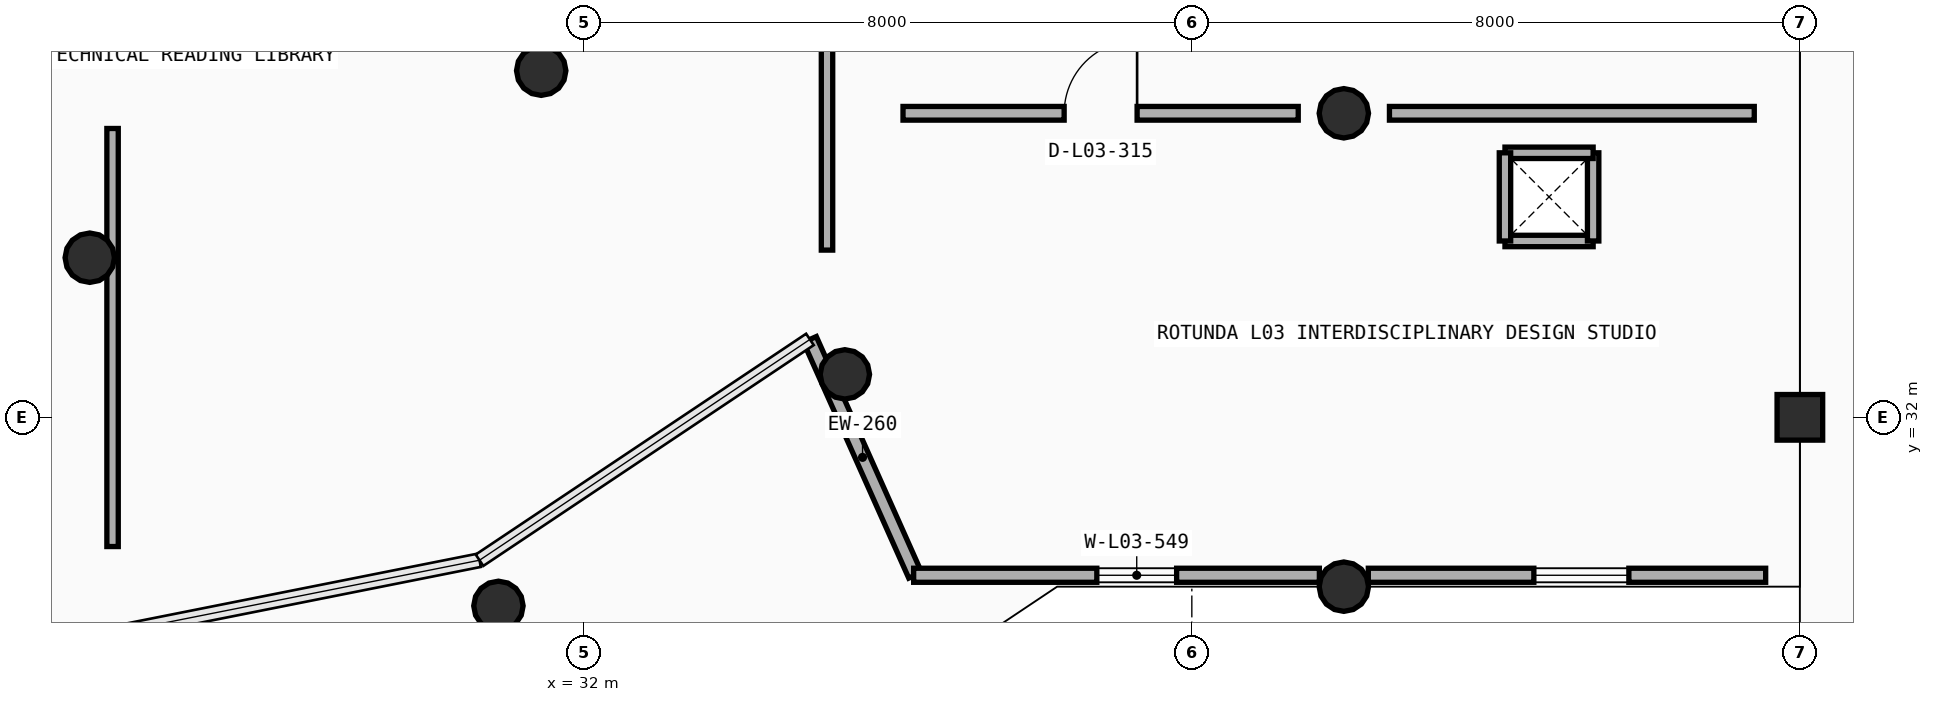
"""IFC4 building model, lengths in metres.
Left out: names, types, materials, properties, quantities, classifications, styles, units other than length and angle.
Written with IfcOpenShell. Run it as: python <this file> out.ifc"""

import sys

from ifc_helpers import new_model, si_unit, direction, frame, frame_2d, origin, origin_2d, place, context, subcontext, project, spatial, rectangle, circle, extrude, element, fill, save


model = new_model("IFC4")
c1 = context("Model", 3, precision=1e-05, world=origin(), true_north=direction((0.0, 1.0)))
c2 = subcontext(c1, "Body", "Model", "MODEL_VIEW")
j1 = project(units=[si_unit("LENGTHUNIT", "METRE"), si_unit("PLANEANGLEUNIT", "RADIAN")], contexts=[c1])
p1 = place(None, origin())
s1 = spatial("IfcSite", under=j1, at=p1, CompositionType="ELEMENT")
p2 = place(p1, origin())
s2 = spatial("IfcBuilding", under=s1, at=p2, CompositionType="ELEMENT")
p3 = place(p2, frame((0.0, 0.0, 9.6)))
s3 = spatial("IfcBuildingStorey", under=s2, at=p3, CompositionType="ELEMENT", Elevation=9.6)
for number, where, z_axis, x_axis in (
    (1, (30.877, 29.52, 0.0), (0.0, 0.0, 1.0), (1.0, 0.0, 0.0)),
    (2, (42.0, 29.772, 0.0), (0.0, 0.0, 1.0), (1.0, 0.0, 0.0)),
):
    element("IfcColumn", number, at=place(p3, frame(where, z_axis=z_axis, x_axis=x_axis)), inside=s3, PredefinedType="COLUMN", context=c2, shape_type="SweptSolid", body=[
        extrude(circle(Radius=0.325, at=origin_2d()), origin(), (0.0, 0.0, 1.0), 4.2),
    ])
p4 = place(p3, frame((48.0, 32.0, 0.0), z_axis=(0.0, 0.0, 1.0), x_axis=(1.0, 0.0, 0.0)))
e3 = element("IfcColumn", 3, at=p4, inside=s3, PredefinedType="COLUMN", context=c2, shape_type="SweptSolid", body=[
    extrude(rectangle(XDim=0.6, YDim=0.6, at=origin_2d()), origin(), (0.0, 0.0, 1.0), 4.2),
])
for number, where, z_axis, x_axis in (
    (4, (35.435, 32.565, 0.0), (0.0, 0.0, 1.0), (1.0, 0.0, 0.0)),
    (5, (25.5, 34.1, 0.0), (0.0, 0.0, 1.0), (1.0, 0.0, 0.0)),
    (6, (42.0, 36.0, 0.0), (0.0, 0.0, 1.0), (1.0, 0.0, 0.0)),
    (7, (31.44, 36.56, 0.0), (0.0, 0.0, 1.0), (1.0, 0.0, 0.0)),
):
    element("IfcColumn", number, at=place(p3, frame(where, z_axis=z_axis, x_axis=x_axis)), inside=s3, PredefinedType="COLUMN", context=c2, shape_type="SweptSolid", body=[
        extrude(circle(Radius=0.325, at=origin_2d()), origin(), (0.0, 0.0, 1.0), 4.2),
    ])
p5 = place(p3, frame((32.342, 25.981, 0.0), z_axis=(0.0, 0.0, 1.0), x_axis=(0.831468390799, 0.555572061125, 0.0)))
e8 = element("IfcWall", 8, at=p5, inside=s3, PredefinedType="PARAPET", context=c2, shape_type="SweptSolid", body=[
    extrude(rectangle(XDim=6.977, YDim=0.2, at=frame_2d((3.488, 0.0))), origin(), (0.0, 0.0, 1.0), 1.15),
])
p6 = place(p3, frame((36.36, 29.922, 0.0), z_axis=(0.0, 0.0, 1.0), x_axis=(-0.40761125598, 0.913155553013, 0.0)))
e9 = element("IfcWall", 9, at=p6, inside=s3, PredefinedType="STANDARD", context=c2, shape_type="SweptSolid", body=[
    extrude(rectangle(XDim=3.398, YDim=0.185, at=frame_2d((1.699, 0.0))), origin(), (0.0, 0.0, 1.0), 3.35),
])
p7 = place(p3, frame((41.678, 29.922, 0.0), z_axis=(0.0, 0.0, 1.0), x_axis=(-1.0, 0.0, 0.0)))
e10 = element("IfcWall", 10, at=p7, inside=s3, PredefinedType="STANDARD", context=c2, shape_type="SweptSolid", body=[
    extrude(rectangle(XDim=5.338, YDim=0.185, at=frame_2d((2.669, 0.0))), origin(), (0.0, 0.0, 1.0), 3.325),
])
p8 = place(p7, frame((1.878, 0.0, 0.9)))
e11 = element("IfcOpeningElement", 11, at=p8, cuts=e10, PredefinedType="OPENING", context=c2, shape_type="SweptSolid", body=[
    extrude(rectangle(XDim=1.05, YDim=1.25, at=frame_2d((0.525, 0.625))), frame((0.0, 0.103, 0.0), z_axis=(0.0, -1.0, 0.0), x_axis=(1.0, 0.0, 0.0)), (0.0, 0.0, 1.0), 0.205),
])
p9 = place(p3, frame((47.55, 29.922, 0.0), z_axis=(0.0, 0.0, 1.0), x_axis=(-1.0, 0.0, 0.0)))
e12 = element("IfcWall", 12, at=p9, inside=s3, PredefinedType="STANDARD", context=c2, shape_type="SweptSolid", body=[
    extrude(rectangle(XDim=5.228, YDim=0.185, at=frame_2d((2.614, 0.0))), origin(), (0.0, 0.0, 1.0), 3.35),
])
p10 = place(p9, frame((1.8, 0.0, 0.9)))
e13 = element("IfcOpeningElement", 13, at=p10, cuts=e12, PredefinedType="OPENING", context=c2, shape_type="SweptSolid", body=[
    extrude(rectangle(XDim=1.25, YDim=1.25, at=frame_2d((0.625, 0.625))), frame((0.0, 0.103, 0.0), z_axis=(0.0, -1.0, 0.0), x_axis=(1.0, 0.0, 0.0)), (0.0, 0.0, 1.0), 0.205),
])
for number, where, z_axis, x_axis in (
    (14, (44.12, 34.32, 0.0), (0.0, 0.0, 1.0), (1.0, 0.0, 0.0)),
    (15, (45.28, 34.32, 0.0), (0.0, 0.0, 1.0), (0.0, 1.0, 0.0)),
    (16, (45.28, 35.48, 0.0), (0.0, 0.0, 1.0), (-1.0, 0.0, 0.0)),
    (17, (44.12, 35.48, 0.0), (0.0, 0.0, 1.0), (0.0, -1.0, 0.0)),
):
    element("IfcWall", number, at=place(p3, frame(where, z_axis=z_axis, x_axis=x_axis)), inside=s3, PredefinedType="PARTITIONING", context=c2, shape_type="SweptSolid", body=[
        extrude(rectangle(XDim=1.16, YDim=0.15, at=frame_2d((0.58, 0.0))), origin(), (0.0, 0.0, 1.0), 3.9),
    ])
p11 = place(p3, frame((42.6, 36.0, 0.0), z_axis=(0.0, 0.0, 1.0), x_axis=(1.0, 0.0, 0.0)))
e18 = element("IfcWall", 18, at=p11, inside=s3, PredefinedType="PARTITIONING", context=c2, shape_type="SweptSolid", body=[
    extrude(rectangle(XDim=4.8, YDim=0.18, at=frame_2d((2.4, 0.0))), origin(), (0.0, 0.0, 1.0), 3.3),
])
p12 = place(p3, frame((25.8, 30.3, 0.0), z_axis=(0.0, 0.0, 1.0), x_axis=(0.0, 1.0, 0.0)))
e19 = element("IfcWall", 19, at=p12, inside=s3, PredefinedType="PARTITIONING", context=c2, shape_type="SweptSolid", body=[
    extrude(rectangle(XDim=5.5, YDim=0.15, at=frame_2d((2.75, 0.0))), origin(), (0.0, 0.0, 1.0), 3.175),
])
p13 = place(p3, frame((36.2, 36.0, 0.0), z_axis=(0.0, 0.0, 1.0), x_axis=(1.0, 0.0, 0.0)))
e20 = element("IfcWall", 20, at=p13, inside=s3, PredefinedType="PARTITIONING", context=c2, shape_type="SweptSolid", body=[
    extrude(rectangle(XDim=5.2, YDim=0.18, at=frame_2d((2.6, 0.0))), origin(), (0.0, 0.0, 1.0), 3.3),
])
p14 = place(p13, frame((2.12, 0.0, 0.0)))
e21 = element("IfcOpeningElement", 21, at=p14, cuts=e20, PredefinedType="OPENING", context=c2, shape_type="SweptSolid", body=[
    extrude(rectangle(XDim=0.96, YDim=2.15, at=frame_2d((0.48, 1.075))), frame((0.0, 0.1, 0.0), z_axis=(0.0, -1.0, 0.0), x_axis=(1.0, 0.0, 0.0)), (0.0, 0.0, 1.0), 0.2),
])
p15 = place(p3, frame((35.2, 34.2, 0.0), z_axis=(0.0, 0.0, 1.0), x_axis=(0.0, 1.0, 0.0)))
e22 = element("IfcWall", 22, at=p15, inside=s3, PredefinedType="PARTITIONING", context=c2, shape_type="SweptSolid", body=[
    extrude(rectangle(XDim=6.4, YDim=0.15, at=frame_2d((3.2, 0.0))), origin(), (0.0, 0.0, 1.0), 3.3),
])
p16 = place(p8, origin())
e23 = element("IfcWindow", 23, at=p16, inside=s3, PartitioningType="SINGLE_PANEL", PredefinedType="WINDOW", context=c2, shape_type="SweptSolid", body=[
    extrude(rectangle(XDim=1.05, YDim=1.25, at=frame_2d((0.525, 0.625))), frame((0.0, 0.03, 0.0), z_axis=(0.0, -1.0, 0.0), x_axis=(1.0, 0.0, 0.0)), (0.0, 0.0, 1.0), 0.06),
])
fill(e11, e23)
p17 = place(p10, origin())
e24 = element("IfcWindow", 24, at=p17, inside=s3, PartitioningType="SINGLE_PANEL", PredefinedType="WINDOW", context=c2, shape_type="SweptSolid", body=[
    extrude(rectangle(XDim=1.25, YDim=1.25, at=frame_2d((0.625, 0.625))), frame((0.0, 0.03, 0.0), z_axis=(0.0, -1.0, 0.0), x_axis=(1.0, 0.0, 0.0)), (0.0, 0.0, 1.0), 0.06),
])
fill(e13, e24)
p18 = place(p14, origin())
e25 = element("IfcDoor", 25, at=p18, inside=s3, OperationType="SINGLE_SWING_RIGHT", PredefinedType="DOOR", context=c2, shape_type="SweptSolid", body=[
    extrude(rectangle(XDim=0.96, YDim=2.15, at=frame_2d((0.48, 1.075))), frame((0.0, 0.025, 0.0), z_axis=(0.0, -1.0, 0.0), x_axis=(1.0, 0.0, 0.0)), (0.0, 0.0, 1.0), 0.05),
])
fill(e21, e25)
save(model, sys.argv[1])
